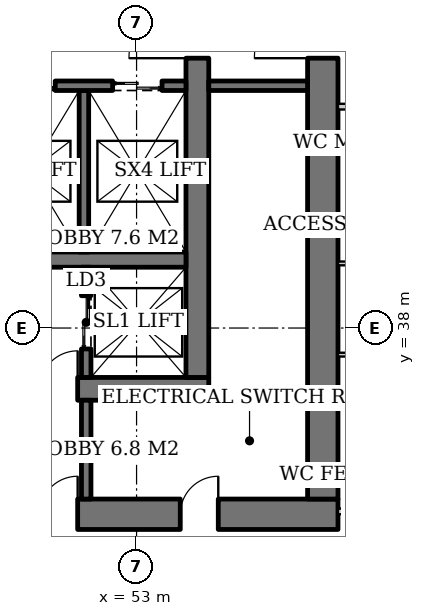
"""IFC4 building model, lengths in metres.
Left out: names, types, materials, properties, quantities, classifications, styles, units other than length and angle.
Written with IfcOpenShell. Run it as: python <this file> out.ifc"""

import sys

from ifc_helpers import new_model, si_unit, direction, frame, frame_2d, origin, place, context, subcontext, project, spatial, rectangle, extrude, element, fill, save


model = new_model("IFC4")
c1 = context("Model", 3, precision=1e-05, world=origin(), true_north=direction((0.0, 1.0)))
c2 = subcontext(c1, "Body", "Model", "MODEL_VIEW")
j1 = project(units=[si_unit("LENGTHUNIT", "METRE"), si_unit("PLANEANGLEUNIT", "RADIAN")], contexts=[c1])
p1 = place(None, origin())
s1 = spatial("IfcSite", under=j1, at=p1, CompositionType="ELEMENT")
p2 = place(p1, origin())
s2 = spatial("IfcBuilding", under=s1, at=p2, CompositionType="ELEMENT")
p3 = place(p2, frame((0.0, 0.0, 6.0)))
s3 = spatial("IfcBuildingStorey", under=s2, at=p3, CompositionType="ELEMENT", Elevation=6.0)
p4 = place(p3, frame((35.1, 36.4, 0.0), z_axis=(0.0, 0.0, 1.0), x_axis=(1.0, 0.0, 0.0)))
e1 = element("IfcWall", 1, at=p4, inside=s3, PredefinedType="SHEAR", context=c2, shape_type="SweptSolid", body=[
    extrude(rectangle(XDim=19.8, YDim=0.6, at=frame_2d((9.9, 0.0))), origin(), (0.0, 0.0, 1.0), 5.0),
])
p5 = place(p4, frame((3.9, 0.0, 0.0)))
e2 = element("IfcOpeningElement", 2, at=p5, cuts=e1, PredefinedType="OPENING", context=c2, shape_type="SweptSolid", body=[
    extrude(rectangle(XDim=1.0, YDim=2.1, at=frame_2d((0.5, 1.05))), frame((0.0, 0.31, 0.0), z_axis=(0.0, -1.0, 0.0), x_axis=(1.0, 0.0, 0.0)), (0.0, 0.0, 1.0), 0.62),
])
p6 = place(p4, frame((15.35, 0.0, 0.0)))
e3 = element("IfcOpeningElement", 3, at=p6, cuts=e1, PredefinedType="OPENING", context=c2, shape_type="SweptSolid", body=[
    extrude(rectangle(XDim=1.0, YDim=2.1, at=frame_2d((0.5, 1.05))), frame((0.0, 0.31, 0.0), z_axis=(0.0, -1.0, 0.0), x_axis=(1.0, 0.0, 0.0)), (0.0, 0.0, 1.0), 0.62),
])
p7 = place(p3, frame((54.6, 36.7, 0.0), z_axis=(0.0, 0.0, 1.0), x_axis=(0.0, 1.0, 0.0)))
e4 = element("IfcWall", 4, at=p7, inside=s3, PredefinedType="SHEAR", context=c2, shape_type="SweptSolid", body=[
    extrude(rectangle(XDim=18.6, YDim=0.6, at=frame_2d((9.3, 0.0))), origin(), (0.0, 0.0, 1.0), 5.0),
])
p8 = place(p7, frame((8.4, 0.0, 0.0)))
e5 = element("IfcOpeningElement", 5, at=p8, cuts=e4, PredefinedType="OPENING", context=c2, shape_type="SweptSolid", body=[
    extrude(rectangle(XDim=1.8, YDim=2.4, at=frame_2d((0.9, 1.2))), frame((0.0, 0.31, 0.0), z_axis=(0.0, -1.0, 0.0), x_axis=(1.0, 0.0, 0.0)), (0.0, 0.0, 1.0), 0.62),
])
p9 = place(p3, frame((31.7, 33.1, 0.0), z_axis=(0.0, 0.0, 1.0), x_axis=(1.0, 0.0, 0.0)))
e6 = element("IfcWall", 6, at=p9, inside=s3, PredefinedType="SHEAR", context=c2, shape_type="SweptSolid", body=[
    extrude(rectangle(XDim=26.6, YDim=0.8, at=frame_2d((13.3, 0.0))), origin(), (0.0, 0.0, 1.0), 5.0),
])
p10 = place(p9, frame((7.3, 0.0, 0.0)))
e7 = element("IfcOpeningElement", 7, at=p10, cuts=e6, PredefinedType="OPENING", context=c2, shape_type="SweptSolid", body=[
    extrude(rectangle(XDim=1.0, YDim=2.1, at=frame_2d((0.5, 1.05))), frame((0.0, 0.41, 0.0), z_axis=(0.0, -1.0, 0.0), x_axis=(1.0, 0.0, 0.0)), (0.0, 0.0, 1.0), 0.82),
])
p11 = place(p9, frame((18.75, 0.0, 0.0)))
e8 = element("IfcOpeningElement", 8, at=p11, cuts=e6, PredefinedType="OPENING", context=c2, shape_type="SweptSolid", body=[
    extrude(rectangle(XDim=1.0, YDim=2.1, at=frame_2d((0.5, 1.05))), frame((0.0, 0.41, 0.0), z_axis=(0.0, -1.0, 0.0), x_axis=(1.0, 0.0, 0.0)), (0.0, 0.0, 1.0), 0.82),
])
p12 = place(p9, frame((3.25, 0.0, 0.0)))
e9 = element("IfcOpeningElement", 9, at=p12, cuts=e6, PredefinedType="OPENING", context=c2, shape_type="SweptSolid", body=[
    extrude(rectangle(XDim=1.0, YDim=2.1, at=frame_2d((0.5, 1.05))), frame((0.0, 0.41, 0.0), z_axis=(0.0, -1.0, 0.0), x_axis=(1.0, 0.0, 0.0)), (0.0, 0.0, 1.0), 0.82),
])
p13 = place(p9, frame((10.42, 0.0, 0.0)))
e10 = element("IfcOpeningElement", 10, at=p13, cuts=e6, PredefinedType="OPENING", context=c2, shape_type="SweptSolid", body=[
    extrude(rectangle(XDim=1.0, YDim=2.1, at=frame_2d((0.5, 1.05))), frame((0.0, 0.41, 0.0), z_axis=(0.0, -1.0, 0.0), x_axis=(1.0, 0.0, 0.0)), (0.0, 0.0, 1.0), 0.82),
])
p14 = place(p9, frame((14.46, 0.0, 0.0)))
e11 = element("IfcOpeningElement", 11, at=p14, cuts=e6, PredefinedType="OPENING", context=c2, shape_type="SweptSolid", body=[
    extrude(rectangle(XDim=1.0, YDim=2.1, at=frame_2d((0.5, 1.05))), frame((0.0, 0.41, 0.0), z_axis=(0.0, -1.0, 0.0), x_axis=(1.0, 0.0, 0.0)), (0.0, 0.0, 1.0), 0.82),
])
p15 = place(p9, frame((22.45, 0.0, 0.0)))
e12 = element("IfcOpeningElement", 12, at=p15, cuts=e6, PredefinedType="OPENING", context=c2, shape_type="SweptSolid", body=[
    extrude(rectangle(XDim=1.0, YDim=2.1, at=frame_2d((0.5, 1.05))), frame((0.0, 0.41, 0.0), z_axis=(0.0, -1.0, 0.0), x_axis=(1.0, 0.0, 0.0)), (0.0, 0.0, 1.0), 0.82),
])
p16 = place(p3, frame((57.9, 33.5, 0.0), z_axis=(0.0, 0.0, 1.0), x_axis=(0.0, 1.0, 0.0)))
e13 = element("IfcWall", 13, at=p16, inside=s3, PredefinedType="SHEAR", context=c2, shape_type="SweptSolid", body=[
    extrude(rectangle(XDim=25.0, YDim=0.8, at=frame_2d((12.5, 0.0))), origin(), (0.0, 0.0, 1.0), 5.0),
])
p17 = place(p16, frame((11.6, 0.0, 0.0)))
e14 = element("IfcOpeningElement", 14, at=p17, cuts=e13, PredefinedType="OPENING", context=c2, shape_type="SweptSolid", body=[
    extrude(rectangle(XDim=1.8, YDim=2.4, at=frame_2d((0.9, 1.2))), frame((0.0, 0.41, 0.0), z_axis=(0.0, -1.0, 0.0), x_axis=(1.0, 0.0, 0.0)), (0.0, 0.0, 1.0), 0.82),
])
p18 = place(p3, frame((35.7, 39.8, 0.0), z_axis=(0.0, 0.0, 1.0), x_axis=(1.0, 0.0, 0.0)))
e15 = element("IfcWall", 15, at=p18, inside=s3, PredefinedType="SHEAR", context=c2, shape_type="SweptSolid", body=[
    extrude(rectangle(XDim=18.6, YDim=0.4, at=frame_2d((9.3, 0.0))), origin(), (0.0, 0.0, 1.0), 5.0),
])
p19 = place(p3, frame((51.675, 36.7, 0.0), z_axis=(0.0, 0.0, 1.0), x_axis=(0.0, 1.0, 0.0)))
e16 = element("IfcWall", 16, at=p19, inside=s3, PredefinedType="SHEAR", context=c2, shape_type="SweptSolid", body=[
    extrude(rectangle(XDim=2.9, YDim=0.25, at=frame_2d((1.45, 0.0))), origin(), (0.0, 0.0, 1.0), 5.0),
])
p20 = place(p19, frame((0.75, 0.0, 0.0)))
e17 = element("IfcOpeningElement", 17, at=p20, cuts=e16, PredefinedType="OPENING", context=c2, shape_type="SweptSolid", body=[
    extrude(rectangle(XDim=1.4, YDim=2.4, at=frame_2d((0.7, 1.2))), frame((0.0, 0.135, 0.0), z_axis=(0.0, -1.0, 0.0), x_axis=(1.0, 0.0, 0.0)), (0.0, 0.0, 1.0), 0.27),
])
p21 = place(p3, frame((51.615, 44.25, 0.0), z_axis=(0.0, 0.0, 1.0), x_axis=(0.0, -1.0, 0.0)))
e18 = element("IfcWall", 18, at=p21, inside=s3, PredefinedType="SHEAR", context=c2, shape_type="SweptSolid", body=[
    extrude(rectangle(XDim=4.25, YDim=0.25, at=frame_2d((2.125, 0.0))), origin(), (0.0, 0.0, 1.0), 5.0),
])
p22 = place(p3, frame((48.93, 44.375, 0.0), z_axis=(0.0, 0.0, 1.0), x_axis=(1.0, 0.0, 0.0)))
e19 = element("IfcWall", 19, at=p22, inside=s3, PredefinedType="SHEAR", context=c2, shape_type="SweptSolid", body=[
    extrude(rectangle(XDim=5.37, YDim=0.25, at=frame_2d((2.685, 0.0))), origin(), (0.0, 0.0, 1.0), 5.0),
])
p23 = place(p22, frame((0.63, 0.0, 0.0)))
e20 = element("IfcOpeningElement", 20, at=p23, cuts=e19, PredefinedType="OPENING", context=c2, shape_type="SweptSolid", body=[
    extrude(rectangle(XDim=1.3, YDim=2.2, at=frame_2d((0.65, 1.1))), frame((0.0, 0.135, 0.0), z_axis=(0.0, -1.0, 0.0), x_axis=(1.0, 0.0, 0.0)), (0.0, 0.0, 1.0), 0.27),
])
p24 = place(p22, frame((3.44, 0.0, 0.0)))
e21 = element("IfcOpeningElement", 21, at=p24, cuts=e19, PredefinedType="OPENING", context=c2, shape_type="SweptSolid", body=[
    extrude(rectangle(XDim=1.3, YDim=2.2, at=frame_2d((0.65, 1.1))), frame((0.0, 0.135, 0.0), z_axis=(0.0, -1.0, 0.0), x_axis=(1.0, 0.0, 0.0)), (0.0, 0.0, 1.0), 0.27),
])
for number, where, z_axis, x_axis in (
    (22, (54.9, 44.375, 0.0), (0.0, 0.0, 1.0), (1.0, 0.0, 0.0)),
    (23, (51.675, 33.5, 0.0), (0.0, 0.0, 1.0), (0.0, 1.0, 0.0)),
):
    element("IfcWall", number, at=place(p3, frame(where, z_axis=z_axis, x_axis=x_axis)), inside=s3, PredefinedType="SOLIDWALL", context=c2, shape_type="SweptSolid", body=[
        extrude(rectangle(XDim=2.6, YDim=0.25, at=frame_2d((1.3, 0.0))), origin(), (0.0, 0.0, 1.0), 4.7),
    ])
p25 = place(p3, frame((60.825, 33.175, 0.0), z_axis=(0.0, 0.0, 1.0), x_axis=(-1.0, 0.0, 0.0)))
e24 = element("IfcWall", 24, at=p25, inside=s3, PredefinedType="PARTITIONING", context=c2, shape_type="SweptSolid", body=[
    extrude(rectangle(XDim=2.525, YDim=0.15, at=frame_2d((1.262, 0.0))), origin(), (0.0, 0.0, 1.0), 3.688),
])
p26 = place(p3, frame((60.825, 37.3, 0.0), z_axis=(0.0, 0.0, 1.0), x_axis=(-1.0, 0.0, 0.0)))
e25 = element("IfcWall", 25, at=p26, inside=s3, PredefinedType="SOLIDWALL", context=c2, shape_type="SweptSolid", body=[
    extrude(rectangle(XDim=2.525, YDim=0.1, at=frame_2d((1.262, 0.0))), origin(), (0.0, 0.0, 1.0), 3.9),
])
p27 = place(p3, frame((60.825, 39.7, 0.0), z_axis=(0.0, 0.0, 1.0), x_axis=(-1.0, 0.0, 0.0)))
e26 = element("IfcWall", 26, at=p27, inside=s3, PredefinedType="SOLIDWALL", context=c2, shape_type="SweptSolid", body=[
    extrude(rectangle(XDim=2.525, YDim=0.1, at=frame_2d((1.262, 0.0))), origin(), (0.0, 0.0, 1.0), 4.7),
])
p28 = place(p3, frame((60.825, 43.825, 0.0), z_axis=(0.0, 0.0, 1.0), x_axis=(-1.0, 0.0, 0.0)))
e27 = element("IfcWall", 27, at=p28, inside=s3, PredefinedType="PARTITIONING", context=c2, shape_type="SweptSolid", body=[
    extrude(rectangle(XDim=2.525, YDim=0.15, at=frame_2d((1.262, 0.0))), origin(), (0.0, 0.0, 1.0), 4.7),
])
p29 = place(p20, origin())
e28 = element("IfcDoor", 28, at=p29, inside=s3, OperationType="DOUBLE_DOOR_SLIDING", PredefinedType="DOOR", context=c2, shape_type="SweptSolid", body=[
    extrude(rectangle(XDim=1.4, YDim=2.4, at=frame_2d((0.7, 1.2))), frame((0.0, 0.025, 0.0), z_axis=(0.0, -1.0, 0.0), x_axis=(1.0, 0.0, 0.0)), (0.0, 0.0, 1.0), 0.05),
])
fill(e17, e28)
p30 = place(p23, origin())
e29 = element("IfcDoor", 29, at=p30, inside=s3, OperationType="DOUBLE_DOOR_SLIDING", PredefinedType="DOOR", context=c2, shape_type="SweptSolid", body=[
    extrude(rectangle(XDim=1.3, YDim=2.2, at=frame_2d((0.65, 1.1))), frame((0.0, 0.025, 0.0), z_axis=(0.0, -1.0, 0.0), x_axis=(1.0, 0.0, 0.0)), (0.0, 0.0, 1.0), 0.05),
])
fill(e20, e29)
p31 = place(p24, origin())
e30 = element("IfcDoor", 30, at=p31, inside=s3, OperationType="DOUBLE_DOOR_SLIDING", PredefinedType="DOOR", context=c2, shape_type="SweptSolid", body=[
    extrude(rectangle(XDim=1.3, YDim=2.2, at=frame_2d((0.65, 1.1))), frame((0.0, 0.025, 0.0), z_axis=(0.0, -1.0, 0.0), x_axis=(1.0, 0.0, 0.0)), (0.0, 0.0, 1.0), 0.05),
])
fill(e21, e30)
p32 = place(p8, origin())
e31 = element("IfcDoor", 31, at=p32, inside=s3, OperationType="DOUBLE_DOOR_SINGLE_SWING", PredefinedType="DOOR", context=c2, shape_type="SweptSolid", body=[
    extrude(rectangle(XDim=1.8, YDim=2.4, at=frame_2d((0.9, 1.2))), frame((0.0, 0.025, 0.0), z_axis=(0.0, -1.0, 0.0), x_axis=(1.0, 0.0, 0.0)), (0.0, 0.0, 1.0), 0.05),
])
fill(e5, e31)
p33 = place(p6, origin())
e32 = element("IfcDoor", 32, at=p33, inside=s3, OperationType="SINGLE_SWING_RIGHT", PredefinedType="DOOR", context=c2, shape_type="SweptSolid", body=[
    extrude(rectangle(XDim=1.0, YDim=2.1, at=frame_2d((0.5, 1.05))), frame((0.0, 0.025, 0.0), z_axis=(0.0, -1.0, 0.0), x_axis=(1.0, 0.0, 0.0)), (0.0, 0.0, 1.0), 0.05),
])
fill(e3, e32)
p34 = place(p17, origin())
e33 = element("IfcDoor", 33, at=p34, inside=s3, OperationType="DOUBLE_DOOR_SINGLE_SWING", PredefinedType="DOOR", context=c2, shape_type="SweptSolid", body=[
    extrude(rectangle(XDim=1.8, YDim=2.4, at=frame_2d((0.9, 1.2))), frame((0.0, 0.025, 0.0), z_axis=(0.0, -1.0, 0.0), x_axis=(1.0, 0.0, 0.0)), (0.0, 0.0, 1.0), 0.05),
])
fill(e14, e33)
p35 = place(p11, origin())
e34 = element("IfcDoor", 34, at=p35, inside=s3, OperationType="SINGLE_SWING_RIGHT", PredefinedType="DOOR", context=c2, shape_type="SweptSolid", body=[
    extrude(rectangle(XDim=1.0, YDim=2.1, at=frame_2d((0.5, 1.05))), frame((0.0, 0.025, 0.0), z_axis=(0.0, -1.0, 0.0), x_axis=(1.0, 0.0, 0.0)), (0.0, 0.0, 1.0), 0.05),
])
fill(e8, e34)
p36 = place(p15, origin())
e35 = element("IfcDoor", 35, at=p36, inside=s3, OperationType="SINGLE_SWING_RIGHT", PredefinedType="DOOR", context=c2, shape_type="SweptSolid", body=[
    extrude(rectangle(XDim=1.0, YDim=2.1, at=frame_2d((0.5, 1.05))), frame((0.0, 0.39, 0.0), z_axis=(0.0, -1.0, 0.0), x_axis=(1.0, 0.0, 0.0)), (0.0, 0.0, 1.0), 0.05),
])
fill(e12, e35)
save(model, sys.argv[1])
